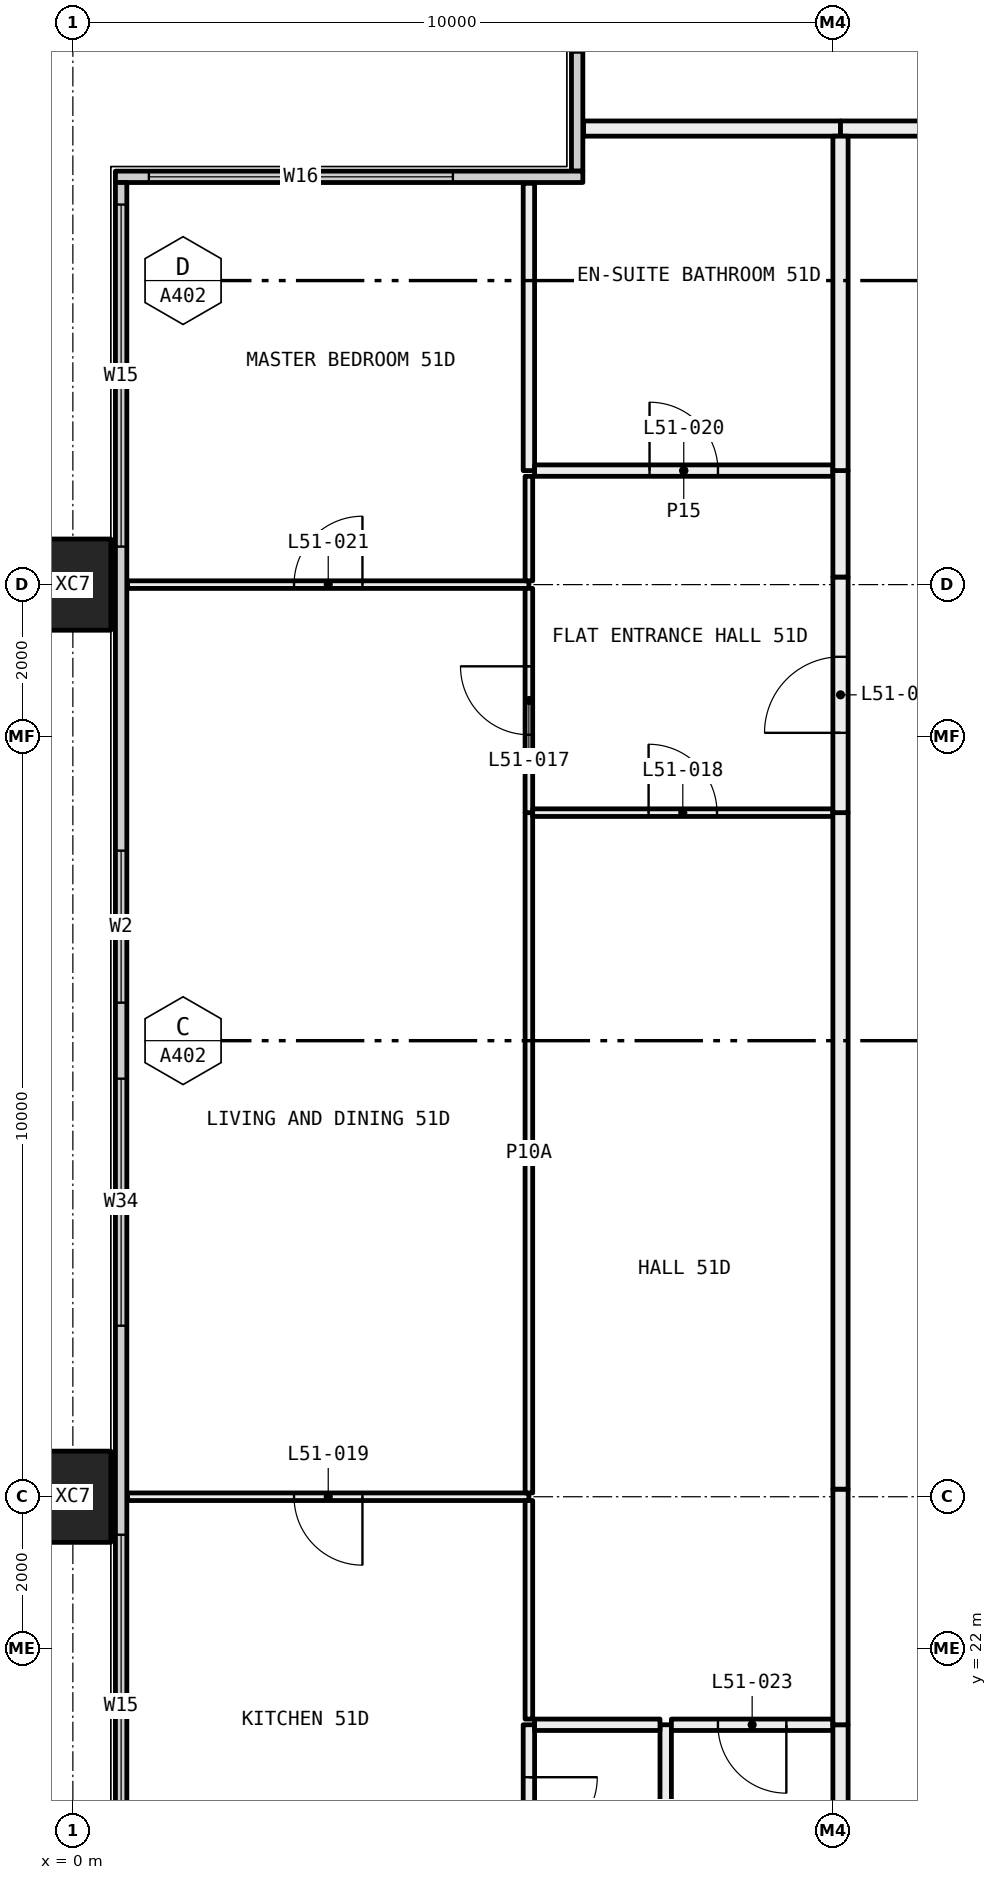
"""IFC4 building model, lengths in metres.
Left out: names, types, materials, properties, quantities, classifications, styles, units other than length and angle.
Written with IfcOpenShell. Run it as: python <this file> out.ifc"""

import sys

from ifc_helpers import new_model, si_unit, direction, frame, frame_2d, origin, origin_2d, place, context, subcontext, project, spatial, rectangle, hollow_rectangle, extrude, element, fill, save


model = new_model("IFC4")
c1 = context("Model", 3, precision=1e-05, world=origin(), true_north=direction((0.0, 1.0)))
c2 = subcontext(c1, "Body", "Model", "MODEL_VIEW")
j1 = project(units=[si_unit("LENGTHUNIT", "METRE"), si_unit("PLANEANGLEUNIT", "RADIAN")], contexts=[c1])
p1 = place(None, origin())
s1 = spatial("IfcSite", under=j1, at=p1, CompositionType="ELEMENT")
p2 = place(p1, origin())
s2 = spatial("IfcBuilding", under=s1, at=p2, CompositionType="ELEMENT")
p3 = place(p2, frame((0.0, 0.0, 192.75)))
s3 = spatial("IfcBuildingStorey", under=s2, at=p3, CompositionType="ELEMENT", Elevation=192.75)
for number, where, z_axis, x_axis in (
    (1, (0.0, 24.0, -0.4), (0.0, 0.0, 1.0), (0.0, 1.0, 0.0)),
    (2, (0.0, 36.0, -0.4), (0.0, 0.0, 1.0), (0.0, 1.0, 0.0)),
):
    element("IfcColumn", number, at=place(p3, frame(where, z_axis=z_axis, x_axis=x_axis)), inside=s3, PredefinedType="COLUMN", context=c2, shape_type="SweptSolid", body=[
        extrude(hollow_rectangle(XDim=1.2, YDim=1.0, WallThickness=0.045, at=origin_2d()), origin(), (0.0, 0.0, 1.0), 3.45),
    ])
p4 = place(p3, frame((6.635, 41.44, 0.0), z_axis=(0.0, 0.0, 1.0), x_axis=(0.0, 1.0, 0.0)))
e3 = element("IfcWall", 3, at=p4, inside=s3, PredefinedType="ELEMENTEDWALL", context=c2, shape_type="SweptSolid", body=[
    extrude(rectangle(XDim=5.85, YDim=0.15, at=frame_2d((2.925, 0.0))), origin(), (0.0, 0.0, 1.0), 3.05),
])
p5 = place(p4, frame((1.56, 0.0, 0.45)))
e4 = element("IfcOpeningElement", 4, at=p5, cuts=e3, PredefinedType="OPENING", context=c2, shape_type="SweptSolid", body=[
    extrude(rectangle(XDim=4.0, YDim=2.55, at=frame_2d((2.0, 1.275))), frame((0.0, 0.085, 0.0), z_axis=(0.0, -1.0, 0.0), x_axis=(1.0, 0.0, 0.0)), (0.0, 0.0, 1.0), 0.17),
])
p6 = place(p3, frame((0.56, 41.365, 0.0), z_axis=(0.0, 0.0, 1.0), x_axis=(1.0, 0.0, 0.0)))
e5 = element("IfcWall", 5, at=p6, inside=s3, PredefinedType="ELEMENTEDWALL", context=c2, shape_type="SweptSolid", body=[
    extrude(rectangle(XDim=6.15, YDim=0.15, at=frame_2d((3.075, 0.0))), origin(), (0.0, 0.0, 1.0), 3.05),
])
p7 = place(p6, frame((0.44, 0.0, 0.45)))
e6 = element("IfcOpeningElement", 6, at=p7, cuts=e5, PredefinedType="OPENING", context=c2, shape_type="SweptSolid", body=[
    extrude(rectangle(XDim=4.0, YDim=2.55, at=frame_2d((2.0, 1.275))), frame((0.0, 0.085, 0.0), z_axis=(0.0, -1.0, 0.0), x_axis=(1.0, 0.0, 0.0)), (0.0, 0.0, 1.0), 0.17),
])
p8 = place(p3, frame((0.635, 18.71, 0.0), z_axis=(0.0, 0.0, 1.0), x_axis=(0.0, 1.0, 0.0)))
e7 = element("IfcWall", 7, at=p8, inside=s3, PredefinedType="ELEMENTEDWALL", context=c2, shape_type="SweptSolid", body=[
    extrude(rectangle(XDim=22.58, YDim=0.15, at=frame_2d((11.29, 0.0))), origin(), (0.0, 0.0, 1.0), 3.05),
])
p9 = place(p8, frame((0.29, 0.0, 0.45)))
e8 = element("IfcOpeningElement", 8, at=p9, cuts=e7, PredefinedType="OPENING", context=c2, shape_type="SweptSolid", body=[
    extrude(rectangle(XDim=4.5, YDim=2.55, at=frame_2d((2.25, 1.275))), frame((0.0, 0.085, 0.0), z_axis=(0.0, -1.0, 0.0), x_axis=(1.0, 0.0, 0.0)), (0.0, 0.0, 1.0), 0.17),
])
p10 = place(p8, frame((7.54, 0.0, 0.45)))
e9 = element("IfcOpeningElement", 9, at=p10, cuts=e7, PredefinedType="OPENING", context=c2, shape_type="SweptSolid", body=[
    extrude(rectangle(XDim=3.25, YDim=2.55, at=frame_2d((1.625, 1.275))), frame((0.0, 0.085, 0.0), z_axis=(0.0, -1.0, 0.0), x_axis=(1.0, 0.0, 0.0)), (0.0, 0.0, 1.0), 0.17),
])
p11 = place(p8, frame((11.79, 0.0, 0.45)))
e10 = element("IfcOpeningElement", 10, at=p11, cuts=e7, PredefinedType="OPENING", context=c2, shape_type="SweptSolid", body=[
    extrude(rectangle(XDim=2.0, YDim=2.55, at=frame_2d((1.0, 1.275))), frame((0.0, 0.085, 0.0), z_axis=(0.0, -1.0, 0.0), x_axis=(1.0, 0.0, 0.0)), (0.0, 0.0, 1.0), 0.17),
])
p12 = place(p8, frame((17.79, 0.0, 0.45)))
e11 = element("IfcOpeningElement", 11, at=p12, cuts=e7, PredefinedType="OPENING", context=c2, shape_type="SweptSolid", body=[
    extrude(rectangle(XDim=4.5, YDim=2.55, at=frame_2d((2.25, 1.275))), frame((0.0, 0.085, 0.0), z_axis=(0.0, -1.0, 0.0), x_axis=(1.0, 0.0, 0.0)), (0.0, 0.0, 1.0), 0.17),
])
p13 = place(p3, frame((6.72, 42.0, 0.0), z_axis=(0.0, 0.0, 1.0), x_axis=(1.0, 0.0, 0.0)))
e12 = element("IfcWall", 12, at=p13, inside=s3, PredefinedType="PARTITIONING", context=c2, shape_type="SweptSolid", body=[
    extrude(rectangle(XDim=3.38, YDim=0.2, at=frame_2d((1.69, 0.0))), origin(), (0.0, 0.0, 1.0), 3.05),
])
p14 = place(p3, frame((10.1, 42.0, 0.0), z_axis=(0.0, 0.0, 1.0), x_axis=(1.0, 0.0, 0.0)))
e13 = element("IfcWall", 13, at=p14, inside=s3, PredefinedType="PARTITIONING", context=c2, shape_type="SweptSolid", body=[
    extrude(rectangle(XDim=1.9, YDim=0.2, at=frame_2d((0.95, 0.0))), origin(), (0.0, 0.0, 1.0), 3.05),
])
p15 = place(p3, frame((6.0, 24.0, 0.0), z_axis=(0.0, 0.0, 1.0), x_axis=(-1.0, 0.0, 0.0)))
e14 = element("IfcWall", 14, at=p15, inside=s3, PredefinedType="PARTITIONING", context=c2, shape_type="SweptSolid", body=[
    extrude(rectangle(XDim=5.28, YDim=0.1, at=frame_2d((2.64, 0.0))), origin(), (0.0, 0.0, 1.0), 2.45),
])
p16 = place(p15, frame((2.19, 0.0, 0.0)))
e15 = element("IfcOpeningElement", 15, at=p16, cuts=e14, PredefinedType="OPENING", context=c2, shape_type="SweptSolid", body=[
    extrude(rectangle(XDim=0.9, YDim=2.1, at=frame_2d((0.45, 1.05))), frame((0.0, 0.06, 0.0), z_axis=(0.0, -1.0, 0.0), x_axis=(1.0, 0.0, 0.0)), (0.0, 0.0, 1.0), 0.12),
])
p17 = place(p3, frame((6.0, 18.72, 0.0), z_axis=(0.0, 0.0, 1.0), x_axis=(0.0, 1.0, 0.0)))
e16 = element("IfcWall", 16, at=p17, inside=s3, PredefinedType="PARTITIONING", context=c2, shape_type="SweptSolid", body=[
    extrude(rectangle(XDim=2.28, YDim=0.15, at=frame_2d((1.14, 0.0))), origin(), (0.0, 0.0, 1.0), 3.05),
])
p18 = place(p17, frame((0.69, 0.0, 0.0)))
e17 = element("IfcOpeningElement", 17, at=p18, cuts=e16, PredefinedType="OPENING", context=c2, shape_type="SweptSolid", body=[
    extrude(rectangle(XDim=0.9, YDim=2.1, at=frame_2d((0.45, 1.05))), frame((0.0, 0.085, 0.0), z_axis=(0.0, -1.0, 0.0), x_axis=(1.0, 0.0, 0.0)), (0.0, 0.0, 1.0), 0.17),
])
p19 = place(p3, frame((6.0, 21.075, 0.0), z_axis=(0.0, 0.0, 1.0), x_axis=(0.0, 1.0, 0.0)))
e18 = element("IfcWall", 18, at=p19, inside=s3, PredefinedType="PARTITIONING", context=c2, shape_type="SweptSolid", body=[
    extrude(rectangle(XDim=2.875, YDim=0.1, at=frame_2d((1.438, 0.0))), origin(), (0.0, 0.0, 1.0), 2.45),
])
p20 = place(p3, frame((6.0, 36.0, 0.0), z_axis=(0.0, 0.0, 1.0), x_axis=(-1.0, 0.0, 0.0)))
e19 = element("IfcWall", 19, at=p20, inside=s3, PredefinedType="PARTITIONING", context=c2, shape_type="SweptSolid", body=[
    extrude(rectangle(XDim=5.28, YDim=0.1, at=frame_2d((2.64, 0.0))), origin(), (0.0, 0.0, 1.0), 2.45),
])
p21 = place(p20, frame((2.19, 0.0, 0.0)))
e20 = element("IfcOpeningElement", 20, at=p21, cuts=e19, PredefinedType="OPENING", context=c2, shape_type="SweptSolid", body=[
    extrude(rectangle(XDim=0.9, YDim=2.1, at=frame_2d((0.45, 1.05))), frame((0.0, 0.06, 0.0), z_axis=(0.0, -1.0, 0.0), x_axis=(1.0, 0.0, 0.0)), (0.0, 0.0, 1.0), 0.12),
])
p22 = place(p3, frame((6.0, 24.05, 0.0), z_axis=(0.0, 0.0, 1.0), x_axis=(0.0, 1.0, 0.0)))
e21 = element("IfcWall", 21, at=p22, inside=s3, PredefinedType="PARTITIONING", context=c2, shape_type="SweptSolid", body=[
    extrude(rectangle(XDim=8.95, YDim=0.1, at=frame_2d((4.475, 0.0))), origin(), (0.0, 0.0, 1.0), 2.45),
])
p23 = place(p3, frame((6.0, 33.0, 0.0), z_axis=(0.0, 0.0, 1.0), x_axis=(0.0, 1.0, 0.0)))
e22 = element("IfcWall", 22, at=p23, inside=s3, PredefinedType="PARTITIONING", context=c2, shape_type="SweptSolid", body=[
    extrude(rectangle(XDim=2.95, YDim=0.1, at=frame_2d((1.475, 0.0))), origin(), (0.0, 0.0, 1.0), 2.45),
])
p24 = place(p23, frame((1.025, 0.0, 0.0)))
e23 = element("IfcOpeningElement", 23, at=p24, cuts=e22, PredefinedType="OPENING", context=c2, shape_type="SweptSolid", body=[
    extrude(rectangle(XDim=0.9, YDim=2.1, at=frame_2d((0.45, 1.05))), frame((0.0, 0.06, 0.0), z_axis=(0.0, -1.0, 0.0), x_axis=(1.0, 0.0, 0.0)), (0.0, 0.0, 1.0), 0.12),
])
p25 = place(p3, frame((6.0, 36.05, 0.0), z_axis=(0.0, 0.0, 1.0), x_axis=(0.0, 1.0, 0.0)))
e24 = element("IfcWall", 24, at=p25, inside=s3, PredefinedType="PARTITIONING", context=c2, shape_type="SweptSolid", body=[
    extrude(rectangle(XDim=1.375, YDim=0.1, at=frame_2d((0.688, 0.0))), origin(), (0.0, 0.0, 1.0), 2.45),
])
p26 = place(p3, frame((6.0, 37.5, 0.0), z_axis=(0.0, 0.0, 1.0), x_axis=(0.0, 1.0, 0.0)))
e25 = element("IfcWall", 25, at=p26, inside=s3, PredefinedType="PARTITIONING", context=c2, shape_type="SweptSolid", body=[
    extrude(rectangle(XDim=3.78, YDim=0.15, at=frame_2d((1.89, 0.0))), origin(), (0.0, 0.0, 1.0), 3.05),
])
p27 = place(p3, frame((7.8, 18.1, 0.0), z_axis=(0.0, 0.0, 1.0), x_axis=(0.0, 1.0, 0.0)))
e26 = element("IfcWall", 26, at=p27, inside=s3, PredefinedType="PARTITIONING", context=c2, shape_type="SweptSolid", body=[
    extrude(rectangle(XDim=2.9, YDim=0.15, at=frame_2d((1.45, 0.0))), origin(), (0.0, 0.0, 1.0), 3.05),
])
p28 = place(p3, frame((7.725, 21.0, 0.0), z_axis=(0.0, 0.0, 1.0), x_axis=(-1.0, 0.0, 0.0)))
e27 = element("IfcWall", 27, at=p28, inside=s3, PredefinedType="PARTITIONING", context=c2, shape_type="SweptSolid", body=[
    extrude(rectangle(XDim=1.65, YDim=0.15, at=frame_2d((0.825, 0.0))), origin(), (0.0, 0.0, 1.0), 3.05),
])
p29 = place(p3, frame((10.0, 21.0, 0.0), z_axis=(0.0, 0.0, 1.0), x_axis=(-1.0, 0.0, 0.0)))
e28 = element("IfcWall", 28, at=p29, inside=s3, PredefinedType="PARTITIONING", context=c2, shape_type="SweptSolid", body=[
    extrude(rectangle(XDim=2.125, YDim=0.15, at=frame_2d((1.062, 0.0))), origin(), (0.0, 0.0, 1.0), 3.05),
])
p30 = place(p29, frame((0.613, 0.0, 0.0)))
e29 = element("IfcOpeningElement", 29, at=p30, cuts=e28, PredefinedType="OPENING", context=c2, shape_type="SweptSolid", body=[
    extrude(rectangle(XDim=0.9, YDim=2.1, at=frame_2d((0.45, 1.05))), frame((0.0, 0.085, 0.0), z_axis=(0.0, -1.0, 0.0), x_axis=(1.0, 0.0, 0.0)), (0.0, 0.0, 1.0), 0.17),
])
p31 = place(p3, frame((10.1, 18.1, 0.0), z_axis=(0.0, 0.0, 1.0), x_axis=(0.0, 1.0, 0.0)))
e30 = element("IfcWall", 30, at=p31, inside=s3, PredefinedType="PARTITIONING", context=c2, shape_type="SweptSolid", body=[
    extrude(rectangle(XDim=2.9, YDim=0.2, at=frame_2d((1.45, 0.0))), origin(), (0.0, 0.0, 1.0), 3.05),
])
p32 = place(p3, frame((10.0, 33.0, 0.0), z_axis=(0.0, 0.0, 1.0), x_axis=(-1.0, 0.0, 0.0)))
e31 = element("IfcWall", 31, at=p32, inside=s3, PredefinedType="PARTITIONING", context=c2, shape_type="SweptSolid", body=[
    extrude(rectangle(XDim=3.95, YDim=0.1, at=frame_2d((1.975, 0.0))), origin(), (0.0, 0.0, 1.0), 3.05),
])
p33 = place(p32, frame((1.525, 0.0, 0.0)))
e32 = element("IfcOpeningElement", 32, at=p33, cuts=e31, PredefinedType="OPENING", context=c2, shape_type="SweptSolid", body=[
    extrude(rectangle(XDim=0.9, YDim=2.1, at=frame_2d((0.45, 1.05))), frame((0.0, 0.06, 0.0), z_axis=(0.0, -1.0, 0.0), x_axis=(1.0, 0.0, 0.0)), (0.0, 0.0, 1.0), 0.12),
])
p34 = place(p3, frame((10.1, 21.0, 0.0), z_axis=(0.0, 0.0, 1.0), x_axis=(0.0, 1.0, 0.0)))
e33 = element("IfcWall", 33, at=p34, inside=s3, PredefinedType="PARTITIONING", context=c2, shape_type="SweptSolid", body=[
    extrude(rectangle(XDim=3.1, YDim=0.2, at=frame_2d((1.55, 0.0))), origin(), (0.0, 0.0, 1.0), 2.45),
])
p35 = place(p3, frame((10.1, 24.1, 0.0), z_axis=(0.0, 0.0, 1.0), x_axis=(0.0, 1.0, 0.0)))
e34 = element("IfcWall", 34, at=p35, inside=s3, PredefinedType="PARTITIONING", context=c2, shape_type="SweptSolid", body=[
    extrude(rectangle(XDim=8.9, YDim=0.2, at=frame_2d((4.45, 0.0))), origin(), (0.0, 0.0, 1.0), 3.05),
])
p36 = place(p3, frame((10.0, 37.5, 0.0), z_axis=(0.0, 0.0, 1.0), x_axis=(-1.0, 0.0, 0.0)))
e35 = element("IfcWall", 35, at=p36, inside=s3, PredefinedType="PARTITIONING", context=c2, shape_type="SweptSolid", body=[
    extrude(rectangle(XDim=3.925, YDim=0.15, at=frame_2d((1.962, 0.0))), origin(), (0.0, 0.0, 1.0), 3.05),
])
p37 = place(p36, frame((1.512, 0.0, 0.0)))
e36 = element("IfcOpeningElement", 36, at=p37, cuts=e35, PredefinedType="OPENING", context=c2, shape_type="SweptSolid", body=[
    extrude(rectangle(XDim=0.9, YDim=2.1, at=frame_2d((0.45, 1.05))), frame((0.0, 0.085, 0.0), z_axis=(0.0, -1.0, 0.0), x_axis=(1.0, 0.0, 0.0)), (0.0, 0.0, 1.0), 0.17),
])
p38 = place(p3, frame((10.1, 33.0, 0.0), z_axis=(0.0, 0.0, 1.0), x_axis=(0.0, 1.0, 0.0)))
e37 = element("IfcWall", 37, at=p38, inside=s3, PredefinedType="PARTITIONING", context=c2, shape_type="SweptSolid", body=[
    extrude(rectangle(XDim=3.1, YDim=0.2, at=frame_2d((1.55, 0.0))), origin(), (0.0, 0.0, 1.0), 2.45),
])
p39 = place(p38, frame((1.05, 0.0, 0.0)))
e38 = element("IfcOpeningElement", 38, at=p39, cuts=e37, PredefinedType="OPENING", context=c2, shape_type="SweptSolid", body=[
    extrude(rectangle(XDim=1.0, YDim=2.1, at=frame_2d((0.5, 1.05))), frame((0.0, 0.11, 0.0), z_axis=(0.0, -1.0, 0.0), x_axis=(1.0, 0.0, 0.0)), (0.0, 0.0, 1.0), 0.22),
])
p40 = place(p3, frame((10.1, 36.1, 0.0), z_axis=(0.0, 0.0, 1.0), x_axis=(0.0, 1.0, 0.0)))
e39 = element("IfcWall", 39, at=p40, inside=s3, PredefinedType="PARTITIONING", context=c2, shape_type="SweptSolid", body=[
    extrude(rectangle(XDim=1.4, YDim=0.2, at=frame_2d((0.7, 0.0))), origin(), (0.0, 0.0, 1.0), 3.05),
])
p41 = place(p3, frame((10.1, 37.5, 0.0), z_axis=(0.0, 0.0, 1.0), x_axis=(0.0, 1.0, 0.0)))
e40 = element("IfcWall", 40, at=p41, inside=s3, PredefinedType="PARTITIONING", context=c2, shape_type="SweptSolid", body=[
    extrude(rectangle(XDim=4.4, YDim=0.2, at=frame_2d((2.2, 0.0))), origin(), (0.0, 0.0, 1.0), 3.05),
])
p42 = place(p7, origin())
e41 = element("IfcWindow", 41, at=p42, inside=s3, PartitioningType="SINGLE_PANEL", PredefinedType="WINDOW", context=c2, shape_type="SweptSolid", body=[
    extrude(rectangle(XDim=4.0, YDim=2.55, at=frame_2d((2.0, 1.275))), frame((0.0, 0.03, 0.0), z_axis=(0.0, -1.0, 0.0), x_axis=(1.0, 0.0, 0.0)), (0.0, 0.0, 1.0), 0.06),
])
fill(e6, e41)
p43 = place(p9, origin())
e42 = element("IfcWindow", 42, at=p43, inside=s3, PartitioningType="SINGLE_PANEL", PredefinedType="WINDOW", context=c2, shape_type="SweptSolid", body=[
    extrude(rectangle(XDim=4.5, YDim=2.55, at=frame_2d((2.25, 1.275))), frame((0.0, 0.03, 0.0), z_axis=(0.0, -1.0, 0.0), x_axis=(1.0, 0.0, 0.0)), (0.0, 0.0, 1.0), 0.06),
])
fill(e8, e42)
p44 = place(p10, origin())
e43 = element("IfcWindow", 43, at=p44, inside=s3, PartitioningType="SINGLE_PANEL", PredefinedType="WINDOW", context=c2, shape_type="SweptSolid", body=[
    extrude(rectangle(XDim=3.25, YDim=2.55, at=frame_2d((1.625, 1.275))), frame((0.0, 0.03, 0.0), z_axis=(0.0, -1.0, 0.0), x_axis=(1.0, 0.0, 0.0)), (0.0, 0.0, 1.0), 0.06),
])
fill(e9, e43)
p45 = place(p11, origin())
e44 = element("IfcWindow", 44, at=p45, inside=s3, PartitioningType="SINGLE_PANEL", PredefinedType="WINDOW", context=c2, shape_type="SweptSolid", body=[
    extrude(rectangle(XDim=2.0, YDim=2.55, at=frame_2d((1.0, 1.275))), frame((0.0, 0.03, 0.0), z_axis=(0.0, -1.0, 0.0), x_axis=(1.0, 0.0, 0.0)), (0.0, 0.0, 1.0), 0.06),
])
fill(e10, e44)
p46 = place(p12, origin())
e45 = element("IfcWindow", 45, at=p46, inside=s3, PartitioningType="SINGLE_PANEL", PredefinedType="WINDOW", context=c2, shape_type="SweptSolid", body=[
    extrude(rectangle(XDim=4.5, YDim=2.55, at=frame_2d((2.25, 1.275))), frame((0.0, 0.03, 0.0), z_axis=(0.0, -1.0, 0.0), x_axis=(1.0, 0.0, 0.0)), (0.0, 0.0, 1.0), 0.06),
])
fill(e11, e45)
p47 = place(p39, origin())
e46 = element("IfcDoor", 46, at=p47, inside=s3, OperationType="SINGLE_SWING_RIGHT", PredefinedType="DOOR", context=c2, shape_type="SweptSolid", body=[
    extrude(rectangle(XDim=1.0, YDim=2.1, at=frame_2d((0.5, 1.05))), frame((0.0, 0.025, 0.0), z_axis=(0.0, -1.0, 0.0), x_axis=(1.0, 0.0, 0.0)), (0.0, 0.0, 1.0), 0.05),
])
fill(e38, e46)
p48 = place(p24, origin())
e47 = element("IfcDoor", 47, at=p48, inside=s3, OperationType="SINGLE_SWING_LEFT", PredefinedType="DOOR", context=c2, shape_type="SweptSolid", body=[
    extrude(rectangle(XDim=0.9, YDim=2.1, at=frame_2d((0.45, 1.05))), frame((0.0, 0.025, 0.0), z_axis=(0.0, -1.0, 0.0), x_axis=(1.0, 0.0, 0.0)), (0.0, 0.0, 1.0), 0.05),
])
fill(e23, e47)
p49 = place(p33, frame((0.9, 0.0, 0.0), x_axis=(-1.0, 0.0, 0.0)))
e48 = element("IfcDoor", 48, at=p49, inside=s3, OperationType="SINGLE_SWING_RIGHT", PredefinedType="DOOR", context=c2, shape_type="SweptSolid", body=[
    extrude(rectangle(XDim=0.9, YDim=2.1, at=frame_2d((0.45, 1.05))), frame((0.0, 0.025, 0.0), z_axis=(0.0, -1.0, 0.0), x_axis=(1.0, 0.0, 0.0)), (0.0, 0.0, 1.0), 0.05),
])
fill(e32, e48)
p50 = place(p16, origin())
e49 = element("IfcDoor", 49, at=p50, inside=s3, OperationType="SINGLE_SWING_RIGHT", PredefinedType="DOOR", context=c2, shape_type="SweptSolid", body=[
    extrude(rectangle(XDim=0.9, YDim=2.1, at=frame_2d((0.45, 1.05))), frame((0.0, 0.025, 0.0), z_axis=(0.0, -1.0, 0.0), x_axis=(1.0, 0.0, 0.0)), (0.0, 0.0, 1.0), 0.05),
])
fill(e15, e49)
p51 = place(p37, frame((0.9, 0.0, 0.0), x_axis=(-1.0, 0.0, 0.0)))
e50 = element("IfcDoor", 50, at=p51, inside=s3, OperationType="SINGLE_SWING_RIGHT", PredefinedType="DOOR", context=c2, shape_type="SweptSolid", body=[
    extrude(rectangle(XDim=0.9, YDim=2.1, at=frame_2d((0.45, 1.05))), frame((0.0, 0.025, 0.0), z_axis=(0.0, -1.0, 0.0), x_axis=(1.0, 0.0, 0.0)), (0.0, 0.0, 1.0), 0.05),
])
fill(e36, e50)
p52 = place(p21, frame((0.9, 0.0, 0.0), x_axis=(-1.0, 0.0, 0.0)))
e51 = element("IfcDoor", 51, at=p52, inside=s3, OperationType="SINGLE_SWING_LEFT", PredefinedType="DOOR", context=c2, shape_type="SweptSolid", body=[
    extrude(rectangle(XDim=0.9, YDim=2.1, at=frame_2d((0.45, 1.05))), frame((0.0, 0.025, 0.0), z_axis=(0.0, -1.0, 0.0), x_axis=(1.0, 0.0, 0.0)), (0.0, 0.0, 1.0), 0.05),
])
fill(e20, e51)
p53 = place(p18, frame((0.9, 0.0, 0.0), x_axis=(-1.0, 0.0, 0.0)))
e52 = element("IfcDoor", 52, at=p53, inside=s3, OperationType="SINGLE_SWING_RIGHT", PredefinedType="DOOR", context=c2, shape_type="SweptSolid", body=[
    extrude(rectangle(XDim=0.9, YDim=2.1, at=frame_2d((0.45, 1.05))), frame((0.0, 0.025, 0.0), z_axis=(0.0, -1.0, 0.0), x_axis=(1.0, 0.0, 0.0)), (0.0, 0.0, 1.0), 0.05),
])
fill(e17, e52)
p54 = place(p30, origin())
e53 = element("IfcDoor", 53, at=p54, inside=s3, OperationType="SINGLE_SWING_RIGHT", PredefinedType="DOOR", context=c2, shape_type="SweptSolid", body=[
    extrude(rectangle(XDim=0.9, YDim=2.1, at=frame_2d((0.45, 1.05))), frame((0.0, 0.025, 0.0), z_axis=(0.0, -1.0, 0.0), x_axis=(1.0, 0.0, 0.0)), (0.0, 0.0, 1.0), 0.05),
])
fill(e29, e53)
save(model, sys.argv[1])
